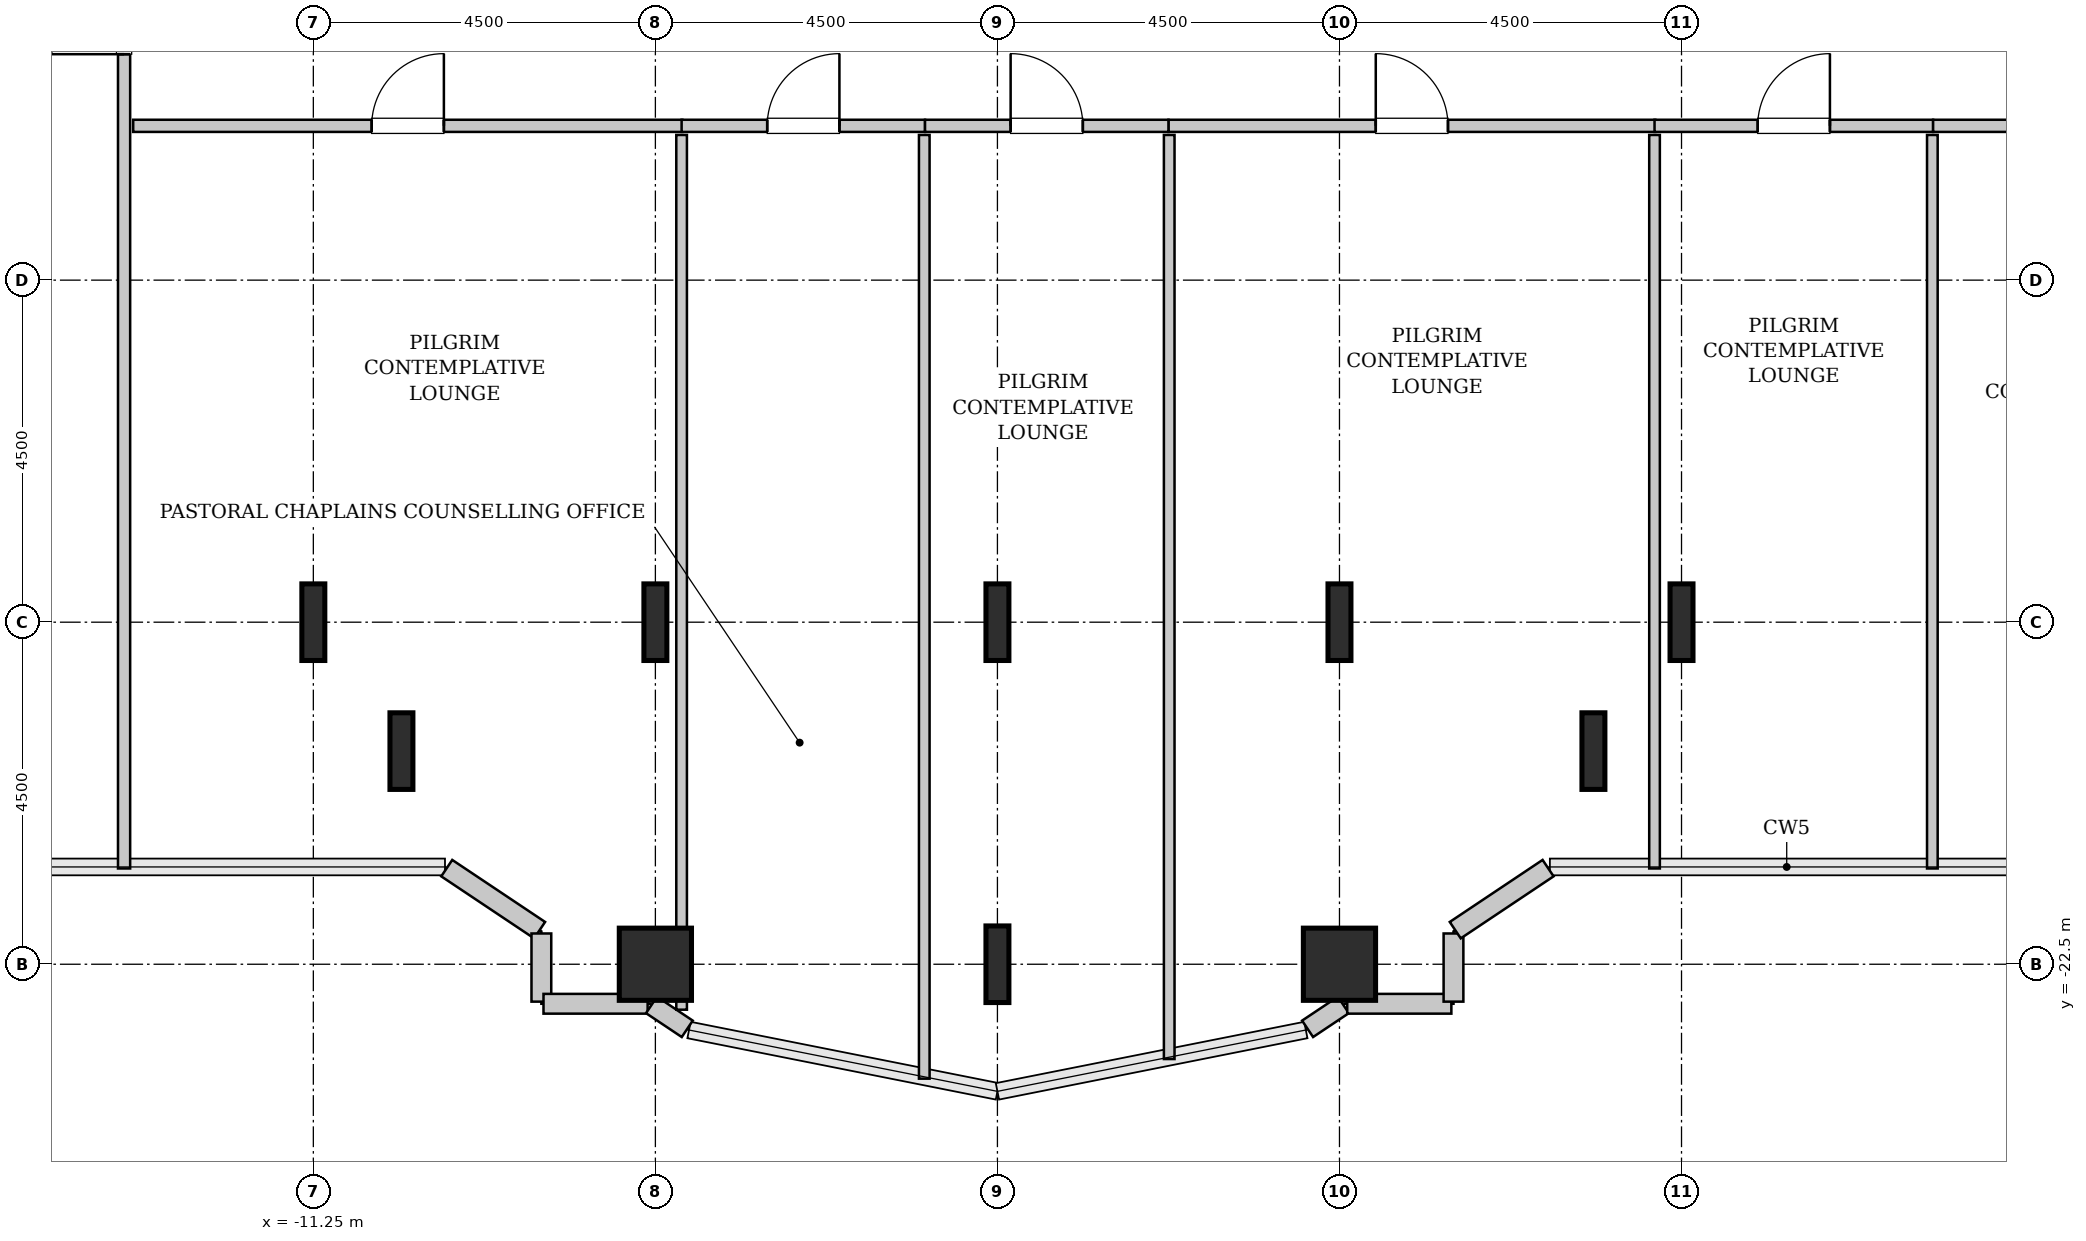
"""IFC4 building model, lengths in metres.
Left out: names, types, materials, properties, quantities, classifications, styles, units other than length and angle.
Written with IfcOpenShell. Run it as: python <this file> out.ifc"""

import sys

from ifc_helpers import new_model, si_unit, direction, frame, frame_2d, origin, origin_2d, place, context, subcontext, project, spatial, rectangle, hollow_rectangle, i_section, extrude, source, transform, mapped, element, fill, save


model = new_model("IFC4")
c1 = context("Model", 3, precision=1e-05, world=origin(), true_north=direction((0.0, 1.0)))
c2 = subcontext(c1, "Body", "Model", "MODEL_VIEW")
j1 = project(units=[si_unit("LENGTHUNIT", "METRE"), si_unit("PLANEANGLEUNIT", "RADIAN")], contexts=[c1])
p1 = place(None, origin())
s1 = spatial("IfcSite", under=j1, at=p1, CompositionType="ELEMENT")
p2 = place(p1, origin())
s2 = spatial("IfcBuilding", under=s1, at=p2, CompositionType="ELEMENT")
p3 = place(p2, frame((0.0, 0.0, 74.8)))
s3 = spatial("IfcBuildingStorey", under=s2, at=p3, CompositionType="ELEMENT", Elevation=74.8)
m1 = source(origin(), c2, "Body", "SweptSolid", [
    extrude(i_section(OverallWidth=0.302, OverallDepth=1.008, WebThickness=0.021, FlangeThickness=0.04, FilletRadius=0.03, at=origin_2d()), origin(), (0.0, 0.0, 1.0), 3.8),
])
for number, where, z_axis, x_axis in (
    (1, (-11.25, -18.0, 0.0), (0.0, 0.0, 1.0), (1.0, 0.0, 0.0)),
    (2, (-10.091, -19.696, 0.0), (0.0, 0.0, 1.0), (1.0, 0.0, 0.0)),
):
    element("IfcColumn", number, at=place(p3, frame(where, z_axis=z_axis, x_axis=x_axis)), inside=s3, PredefinedType="COLUMN", context=c2, shape_type="MappedRepresentation", body=[
        mapped(m1, transform((0.0, 0.0, 0.0), x_axis=(1.0, 0.0, 0.0), y_axis=(0.0, 1.0, 0.0), z_axis=(0.0, 0.0, 1.0), scale=1.0)),
    ])
m2 = source(origin(), c2, "Body", "SweptSolid", [
    extrude(hollow_rectangle(XDim=0.95, YDim=0.95, WallThickness=0.045, InnerFilletRadius=0.045, OuterFilletRadius=0.09, at=origin_2d()), origin(), (0.0, 0.0, 1.0), 3.8),
])
p4 = place(p3, frame((-6.75, -22.5, 0.0), z_axis=(0.0, 0.0, 1.0), x_axis=(1.0, 0.0, 0.0)))
e3 = element("IfcColumn", 3, at=p4, inside=s3, PredefinedType="COLUMN", context=c2, shape_type="MappedRepresentation", body=[
    mapped(m2, transform((0.0, 0.0, 0.0), x_axis=(1.0, 0.0, 0.0), y_axis=(0.0, 1.0, 0.0), z_axis=(0.0, 0.0, 1.0), scale=1.0)),
])
for number, where, z_axis, x_axis in (
    (4, (-6.75, -18.0, 0.0), (0.0, 0.0, 1.0), (1.0, 0.0, 0.0)),
    (5, (-2.25, -22.5, 0.0), (0.0, 0.0, 1.0), (1.0, 0.0, 0.0)),
    (6, (-2.25, -18.0, 0.0), (0.0, 0.0, 1.0), (1.0, 0.0, 0.0)),
):
    element("IfcColumn", number, at=place(p3, frame(where, z_axis=z_axis, x_axis=x_axis)), inside=s3, PredefinedType="COLUMN", context=c2, shape_type="MappedRepresentation", body=[
        mapped(m1, transform((0.0, 0.0, 0.0), x_axis=(1.0, 0.0, 0.0), y_axis=(0.0, 1.0, 0.0), z_axis=(0.0, 0.0, 1.0), scale=1.0)),
    ])
p5 = place(p3, frame((2.25, -22.5, 0.0), z_axis=(0.0, 0.0, 1.0), x_axis=(1.0, 0.0, 0.0)))
e7 = element("IfcColumn", 7, at=p5, inside=s3, PredefinedType="COLUMN", context=c2, shape_type="MappedRepresentation", body=[
    mapped(m2, transform((0.0, 0.0, 0.0), x_axis=(1.0, 0.0, 0.0), y_axis=(0.0, 1.0, 0.0), z_axis=(0.0, 0.0, 1.0), scale=1.0)),
])
for number, where, z_axis, x_axis in (
    (8, (2.25, -18.0, 0.0), (0.0, 0.0, 1.0), (1.0, 0.0, 0.0)),
    (9, (5.591, -19.696, 0.0), (0.0, 0.0, 1.0), (1.0, 0.0, 0.0)),
    (10, (6.75, -18.0, 0.0), (0.0, 0.0, 1.0), (1.0, 0.0, 0.0)),
):
    element("IfcColumn", number, at=place(p3, frame(where, z_axis=z_axis, x_axis=x_axis)), inside=s3, PredefinedType="COLUMN", context=c2, shape_type="MappedRepresentation", body=[
        mapped(m1, transform((0.0, 0.0, 0.0), x_axis=(1.0, 0.0, 0.0), y_axis=(0.0, 1.0, 0.0), z_axis=(0.0, 0.0, 1.0), scale=1.0)),
    ])
m3 = source(origin(), c2, "Body", "SweptSolid", [
    extrude(rectangle(XDim=1.469, YDim=0.26, at=frame_2d((0.734, 0.0))), origin(), (0.0, 0.0, 1.0), 3.55),
])
p6 = place(p3, frame((-9.495, -21.236, 0.0), z_axis=(0.0, 0.0, 1.0), x_axis=(0.831461760506, -0.555581983884, 0.0)))
e11 = element("IfcWall", 11, at=p6, inside=s3, PredefinedType="SOLIDWALL", context=c2, shape_type="MappedRepresentation", body=[
    mapped(m3, transform((0.0, 0.0, 0.0), x_axis=(1.0, 0.0, 0.0), y_axis=(0.0, 1.0, 0.0), z_axis=(0.0, 0.0, 1.0), scale=1.0)),
])
m4 = source(origin(), c2, "Body", "SweptSolid", [
    extrude(rectangle(XDim=0.897, YDim=0.26, at=frame_2d((0.448, 0.0))), origin(), (0.0, 0.0, 1.0), 3.55),
])
p7 = place(p3, frame((-8.25, -22.095, 0.0), z_axis=(0.0, 0.0, 1.0), x_axis=(0.0, -1.0, 0.0)))
e12 = element("IfcWall", 12, at=p7, inside=s3, PredefinedType="SOLIDWALL", context=c2, shape_type="MappedRepresentation", body=[
    mapped(m4, transform((0.0, 0.0, 0.0), x_axis=(1.0, 0.0, 0.0), y_axis=(0.0, 1.0, 0.0), z_axis=(0.0, 0.0, 1.0), scale=1.0)),
])
m5 = source(origin(), c2, "Body", "SweptSolid", [
    extrude(rectangle(XDim=1.37, YDim=0.26, at=frame_2d((0.685, 0.0))), origin(), (0.0, 0.0, 1.0), 3.55),
])
p8 = place(p3, frame((-8.222, -23.02, 0.0), z_axis=(0.0, 0.0, 1.0), x_axis=(1.0, 0.0, 0.0)))
e13 = element("IfcWall", 13, at=p8, inside=s3, PredefinedType="SOLIDWALL", context=c2, shape_type="MappedRepresentation", body=[
    mapped(m5, transform((0.0, 0.0, 0.0), x_axis=(1.0, 0.0, 0.0), y_axis=(0.0, 1.0, 0.0), z_axis=(0.0, 0.0, 1.0), scale=1.0)),
])
m6 = source(origin(), c2, "Body", "SweptSolid", [
    extrude(rectangle(XDim=0.565, YDim=0.26, at=frame_2d((0.283, 0.0))), origin(), (0.0, 0.0, 1.0), 3.55),
])
for number, where, z_axis, x_axis in (
    (14, (-6.801, -23.036, 0.0), (0.0, 0.0, 1.0), (0.832, -0.555, 0.0)),
    (15, (1.831, -23.35, 0.0), (0.0, 0.0, 1.0), (0.832, 0.555, 0.0)),
):
    element("IfcWall", number, at=place(p3, frame(where, z_axis=z_axis, x_axis=x_axis)), inside=s3, PredefinedType="SOLIDWALL", context=c2, shape_type="MappedRepresentation", body=[
        mapped(m6, transform((0.0, 0.0, 0.0), x_axis=(1.0, 0.0, 0.0), y_axis=(0.0, 1.0, 0.0), z_axis=(0.0, 0.0, 1.0), scale=1.0)),
    ])
p9 = place(p3, frame((2.352, -23.02, 0.0), z_axis=(0.0, 0.0, 1.0), x_axis=(1.0, 0.0, 0.0)))
e16 = element("IfcWall", 16, at=p9, inside=s3, PredefinedType="SOLIDWALL", context=c2, shape_type="MappedRepresentation", body=[
    mapped(m5, transform((0.0, 0.0, 0.0), x_axis=(1.0, 0.0, 0.0), y_axis=(0.0, 1.0, 0.0), z_axis=(0.0, 0.0, 1.0), scale=1.0)),
])
p10 = place(p3, frame((3.75, -22.992, 0.0), z_axis=(0.0, 0.0, 1.0), x_axis=(0.0, 1.0, 0.0)))
e17 = element("IfcWall", 17, at=p10, inside=s3, PredefinedType="SOLIDWALL", context=c2, shape_type="MappedRepresentation", body=[
    mapped(m4, transform((0.0, 0.0, 0.0), x_axis=(1.0, 0.0, 0.0), y_axis=(0.0, 1.0, 0.0), z_axis=(0.0, 0.0, 1.0), scale=1.0)),
])
p11 = place(p3, frame((3.773, -22.052, 0.0), z_axis=(0.0, 0.0, 1.0), x_axis=(0.831461760506, 0.555581983884, 0.0)))
e18 = element("IfcWall", 18, at=p11, inside=s3, PredefinedType="SOLIDWALL", context=c2, shape_type="MappedRepresentation", body=[
    mapped(m3, transform((0.0, 0.0, 0.0), x_axis=(1.0, 0.0, 0.0), y_axis=(0.0, 1.0, 0.0), z_axis=(0.0, 0.0, 1.0), scale=1.0)),
])
m7 = source(origin(), c2, "Body", "SweptSolid", [
    extrude(rectangle(XDim=12.645, YDim=0.16, at=frame_2d((6.323, 0.0))), origin(), (0.0, 0.0, 1.0), 3.535),
])
p12 = place(p3, frame((-13.74, -21.24, 0.0), z_axis=(0.0, 0.0, 1.0), x_axis=(0.0, 1.0, 0.0)))
e19 = element("IfcWall", 19, at=p12, inside=s3, PredefinedType="PARTITIONING", context=c2, shape_type="MappedRepresentation", body=[
    mapped(m7, transform((0.0, 0.0, 0.0), x_axis=(1.0, 0.0, 0.0), y_axis=(0.0, 1.0, 0.0), z_axis=(0.0, 0.0, 1.0), scale=1.0)),
])
p13 = place(p12, frame((10.712, 0.0, 0.0)))
e20 = element("IfcOpeningElement", 20, at=p13, cuts=e19, PredefinedType="OPENING", context=c2, shape_type="SweptSolid", body=[
    extrude(rectangle(XDim=0.95, YDim=2.1, at=frame_2d((0.475, 1.05))), frame((0.0, 0.09, 0.0), z_axis=(0.0, -1.0, 0.0), x_axis=(1.0, 0.0, 0.0)), (0.0, 0.0, 1.0), 0.18),
])
m8 = source(origin(), c2, "Body", "SweptSolid", [
    extrude(rectangle(XDim=7.225, YDim=0.16, at=frame_2d((3.613, 0.0))), origin(), (0.0, 0.0, 1.0), 3.535),
])
p14 = place(p3, frame((-13.62, -11.47, 0.0), z_axis=(0.0, 0.0, 1.0), x_axis=(1.0, 0.0, 0.0)))
e21 = element("IfcWall", 21, at=p14, inside=s3, PredefinedType="PARTITIONING", context=c2, shape_type="MappedRepresentation", body=[
    mapped(m8, transform((0.0, 0.0, 0.0), x_axis=(1.0, 0.0, 0.0), y_axis=(0.0, 1.0, 0.0), z_axis=(0.0, 0.0, 1.0), scale=1.0)),
])
p15 = place(p14, frame((3.137, 0.0, 0.0)))
e22 = element("IfcOpeningElement", 22, at=p15, cuts=e21, PredefinedType="OPENING", context=c2, shape_type="SweptSolid", body=[
    extrude(rectangle(XDim=0.95, YDim=2.1, at=frame_2d((0.475, 1.05))), frame((0.0, 0.09, 0.0), z_axis=(0.0, -1.0, 0.0), x_axis=(1.0, 0.0, 0.0)), (0.0, 0.0, 1.0), 0.18),
])
m9 = source(origin(), c2, "Body", "SweptSolid", [
    extrude(rectangle(XDim=11.508, YDim=0.14, at=frame_2d((5.754, 0.0))), origin(), (0.0, 0.0, 1.0), 2.825),
])
p16 = place(p3, frame((-6.405, -23.098, 0.0), z_axis=(0.0, 0.0, 1.0), x_axis=(0.0, 1.0, 0.0)))
e23 = element("IfcWall", 23, at=p16, inside=s3, PredefinedType="PARTITIONING", context=c2, shape_type="MappedRepresentation", body=[
    mapped(m9, transform((0.0, 0.0, 0.0), x_axis=(1.0, 0.0, 0.0), y_axis=(0.0, 1.0, 0.0), z_axis=(0.0, 0.0, 1.0), scale=1.0)),
])
m10 = source(origin(), c2, "Body", "SweptSolid", [
    extrude(rectangle(XDim=6.405, YDim=0.16, at=frame_2d((3.203, 0.0))), origin(), (0.0, 0.0, 1.0), 3.535),
])
p17 = place(p3, frame((0.0, -11.47, 0.0), z_axis=(0.0, 0.0, 1.0), x_axis=(1.0, 0.0, 0.0)))
e24 = element("IfcWall", 24, at=p17, inside=s3, PredefinedType="PARTITIONING", context=c2, shape_type="MappedRepresentation", body=[
    mapped(m10, transform((0.0, 0.0, 0.0), x_axis=(1.0, 0.0, 0.0), y_axis=(0.0, 1.0, 0.0), z_axis=(0.0, 0.0, 1.0), scale=1.0)),
])
p18 = place(p17, frame((2.728, 0.0, 0.0)))
e25 = element("IfcOpeningElement", 25, at=p18, cuts=e24, PredefinedType="OPENING", context=c2, shape_type="SweptSolid", body=[
    extrude(rectangle(XDim=0.95, YDim=2.1, at=frame_2d((0.475, 1.05))), frame((0.0, 0.09, 0.0), z_axis=(0.0, -1.0, 0.0), x_axis=(1.0, 0.0, 0.0)), (0.0, 0.0, 1.0), 0.18),
])
m11 = source(origin(), c2, "Body", "SweptSolid", [
    extrude(rectangle(XDim=12.157, YDim=0.14, at=frame_2d((6.079, 0.0))), origin(), (0.0, 0.0, 1.0), 3.535),
])
p19 = place(p3, frame((0.01, -23.747, 0.0), z_axis=(0.0, 0.0, 1.0), x_axis=(0.0, 1.0, 0.0)))
e26 = element("IfcWall", 26, at=p19, inside=s3, PredefinedType="PARTITIONING", context=c2, shape_type="MappedRepresentation", body=[
    mapped(m11, transform((0.0, 0.0, 0.0), x_axis=(1.0, 0.0, 0.0), y_axis=(0.0, 1.0, 0.0), z_axis=(0.0, 0.0, 1.0), scale=1.0)),
])
m12 = source(origin(), c2, "Body", "SweptSolid", [
    extrude(rectangle(XDim=9.65, YDim=0.14, at=frame_2d((4.825, 0.0))), origin(), (0.0, 0.0, 1.0), 3.535),
])
p20 = place(p3, frame((6.395, -21.24, 0.0), z_axis=(0.0, 0.0, 1.0), x_axis=(0.0, 1.0, 0.0)))
e27 = element("IfcWall", 27, at=p20, inside=s3, PredefinedType="PARTITIONING", context=c2, shape_type="MappedRepresentation", body=[
    mapped(m12, transform((0.0, 0.0, 0.0), x_axis=(1.0, 0.0, 0.0), y_axis=(0.0, 1.0, 0.0), z_axis=(0.0, 0.0, 1.0), scale=1.0)),
])
m13 = source(origin(), c2, "Body", "SweptSolid", [
    extrude(rectangle(XDim=3.203, YDim=0.16, at=frame_2d((1.601, 0.0))), origin(), (0.0, 0.0, 1.0), 3.535),
])
p21 = place(p3, frame((-6.405, -11.47, 0.0), z_axis=(0.0, 0.0, 1.0), x_axis=(1.0, 0.0, 0.0)))
e28 = element("IfcWall", 28, at=p21, inside=s3, PredefinedType="PARTITIONING", context=c2, shape_type="MappedRepresentation", body=[
    mapped(m13, transform((0.0, 0.0, 0.0), x_axis=(1.0, 0.0, 0.0), y_axis=(0.0, 1.0, 0.0), z_axis=(0.0, 0.0, 1.0), scale=1.0)),
])
p22 = place(p21, frame((1.126, 0.0, 0.0)))
e29 = element("IfcOpeningElement", 29, at=p22, cuts=e28, PredefinedType="OPENING", context=c2, shape_type="SweptSolid", body=[
    extrude(rectangle(XDim=0.95, YDim=2.1, at=frame_2d((0.475, 1.05))), frame((0.0, 0.09, 0.0), z_axis=(0.0, -1.0, 0.0), x_axis=(1.0, 0.0, 0.0)), (0.0, 0.0, 1.0), 0.18),
])
m14 = source(origin(), c2, "Body", "SweptSolid", [
    extrude(rectangle(XDim=12.415, YDim=0.14, at=frame_2d((6.208, 0.0))), origin(), (0.0, 0.0, 1.0), 3.535),
])
p23 = place(p3, frame((-3.212, -24.005, 0.0), z_axis=(0.0, 0.0, 1.0), x_axis=(0.0, 1.0, 0.0)))
e30 = element("IfcWall", 30, at=p23, inside=s3, PredefinedType="PARTITIONING", context=c2, shape_type="MappedRepresentation", body=[
    mapped(m14, transform((0.0, 0.0, 0.0), x_axis=(1.0, 0.0, 0.0), y_axis=(0.0, 1.0, 0.0), z_axis=(0.0, 0.0, 1.0), scale=1.0)),
])
m15 = source(origin(), c2, "Body", "SweptSolid", [
    extrude(rectangle(XDim=3.202, YDim=0.16, at=frame_2d((1.601, 0.0))), origin(), (0.0, 0.0, 1.0), 3.535),
])
p24 = place(p3, frame((-3.202, -11.47, 0.0), z_axis=(0.0, 0.0, 1.0), x_axis=(1.0, 0.0, 0.0)))
e31 = element("IfcWall", 31, at=p24, inside=s3, PredefinedType="PARTITIONING", context=c2, shape_type="MappedRepresentation", body=[
    mapped(m15, transform((0.0, 0.0, 0.0), x_axis=(1.0, 0.0, 0.0), y_axis=(0.0, 1.0, 0.0), z_axis=(0.0, 0.0, 1.0), scale=1.0)),
])
p25 = place(p24, frame((1.126, 0.0, 0.0)))
e32 = element("IfcOpeningElement", 32, at=p25, cuts=e31, PredefinedType="OPENING", context=c2, shape_type="SweptSolid", body=[
    extrude(rectangle(XDim=0.95, YDim=2.1, at=frame_2d((0.475, 1.05))), frame((0.0, 0.09, 0.0), z_axis=(0.0, -1.0, 0.0), x_axis=(1.0, 0.0, 0.0)), (0.0, 0.0, 1.0), 0.18),
])
m16 = source(origin(), c2, "Body", "SweptSolid", [
    extrude(rectangle(XDim=3.665, YDim=0.16, at=frame_2d((1.833, 0.0))), origin(), (0.0, 0.0, 1.0), 3.535),
])
p26 = place(p3, frame((6.395, -11.47, 0.0), z_axis=(0.0, 0.0, 1.0), x_axis=(1.0, 0.0, 0.0)))
e33 = element("IfcWall", 33, at=p26, inside=s3, PredefinedType="PARTITIONING", context=c2, shape_type="MappedRepresentation", body=[
    mapped(m16, transform((0.0, 0.0, 0.0), x_axis=(1.0, 0.0, 0.0), y_axis=(0.0, 1.0, 0.0), z_axis=(0.0, 0.0, 1.0), scale=1.0)),
])
p27 = place(p26, frame((1.357, 0.0, 0.0)))
e34 = element("IfcOpeningElement", 34, at=p27, cuts=e33, PredefinedType="OPENING", context=c2, shape_type="SweptSolid", body=[
    extrude(rectangle(XDim=0.95, YDim=2.1, at=frame_2d((0.475, 1.05))), frame((0.0, 0.09, 0.0), z_axis=(0.0, -1.0, 0.0), x_axis=(1.0, 0.0, 0.0)), (0.0, 0.0, 1.0), 0.18),
])
p28 = place(p3, frame((10.05, -21.24, 0.0), z_axis=(0.0, 0.0, 1.0), x_axis=(0.0, 1.0, 0.0)))
e35 = element("IfcWall", 35, at=p28, inside=s3, PredefinedType="PARTITIONING", context=c2, shape_type="MappedRepresentation", body=[
    mapped(m12, transform((0.0, 0.0, 0.0), x_axis=(1.0, 0.0, 0.0), y_axis=(0.0, 1.0, 0.0), z_axis=(0.0, 0.0, 1.0), scale=1.0)),
])
m17 = source(origin(), c2, "Body", "SweptSolid", [
    extrude(rectangle(XDim=3.56, YDim=0.16, at=frame_2d((1.78, 0.0))), origin(), (0.0, 0.0, 1.0), 3.535),
])
p29 = place(p3, frame((10.06, -11.47, 0.0), z_axis=(0.0, 0.0, 1.0), x_axis=(1.0, 0.0, 0.0)))
e36 = element("IfcWall", 36, at=p29, inside=s3, PredefinedType="PARTITIONING", context=c2, shape_type="MappedRepresentation", body=[
    mapped(m17, transform((0.0, 0.0, 0.0), x_axis=(1.0, 0.0, 0.0), y_axis=(0.0, 1.0, 0.0), z_axis=(0.0, 0.0, 1.0), scale=1.0)),
])
p30 = place(p29, frame((1.305, 0.0, 0.0)))
e37 = element("IfcOpeningElement", 37, at=p30, cuts=e36, PredefinedType="OPENING", context=c2, shape_type="SweptSolid", body=[
    extrude(rectangle(XDim=0.95, YDim=2.1, at=frame_2d((0.475, 1.05))), frame((0.0, 0.09, 0.0), z_axis=(0.0, -1.0, 0.0), x_axis=(1.0, 0.0, 0.0)), (0.0, 0.0, 1.0), 0.18),
])
m18 = source(origin(), c2, "Body", "SweptSolid", [
    extrude(rectangle(XDim=0.95, YDim=2.1, at=frame_2d((0.475, 1.05))), frame((0.0, 0.025, 0.0), z_axis=(0.0, -1.0, 0.0), x_axis=(1.0, 0.0, 0.0)), (0.0, 0.0, 1.0), 0.05),
])
p31 = place(p13, origin())
e38 = element("IfcDoor", 38, at=p31, inside=s3, OperationType="SINGLE_SWING_LEFT", PredefinedType="DOOR", context=c2, shape_type="MappedRepresentation", body=[
    mapped(m18, transform((0.0, 0.0, 0.0), x_axis=(1.0, 0.0, 0.0), y_axis=(0.0, 1.0, 0.0), z_axis=(0.0, 0.0, 1.0), scale=1.0)),
])
fill(e20, e38)
p32 = place(p15, origin())
e39 = element("IfcDoor", 39, at=p32, inside=s3, OperationType="SINGLE_SWING_RIGHT", PredefinedType="DOOR", context=c2, shape_type="MappedRepresentation", body=[
    mapped(m18, transform((0.0, 0.0, 0.0), x_axis=(1.0, 0.0, 0.0), y_axis=(0.0, 1.0, 0.0), z_axis=(0.0, 0.0, 1.0), scale=1.0)),
])
fill(e22, e39)
p33 = place(p18, origin())
e40 = element("IfcDoor", 40, at=p33, inside=s3, OperationType="SINGLE_SWING_LEFT", PredefinedType="DOOR", context=c2, shape_type="MappedRepresentation", body=[
    mapped(m18, transform((0.0, 0.0, 0.0), x_axis=(1.0, 0.0, 0.0), y_axis=(0.0, 1.0, 0.0), z_axis=(0.0, 0.0, 1.0), scale=1.0)),
])
fill(e25, e40)
p34 = place(p22, origin())
e41 = element("IfcDoor", 41, at=p34, inside=s3, OperationType="SINGLE_SWING_RIGHT", PredefinedType="DOOR", context=c2, shape_type="MappedRepresentation", body=[
    mapped(m18, transform((0.0, 0.0, 0.0), x_axis=(1.0, 0.0, 0.0), y_axis=(0.0, 1.0, 0.0), z_axis=(0.0, 0.0, 1.0), scale=1.0)),
])
fill(e29, e41)
p35 = place(p25, origin())
e42 = element("IfcDoor", 42, at=p35, inside=s3, OperationType="SINGLE_SWING_LEFT", PredefinedType="DOOR", context=c2, shape_type="MappedRepresentation", body=[
    mapped(m18, transform((0.0, 0.0, 0.0), x_axis=(1.0, 0.0, 0.0), y_axis=(0.0, 1.0, 0.0), z_axis=(0.0, 0.0, 1.0), scale=1.0)),
])
fill(e32, e42)
p36 = place(p27, origin())
e43 = element("IfcDoor", 43, at=p36, inside=s3, OperationType="SINGLE_SWING_RIGHT", PredefinedType="DOOR", context=c2, shape_type="MappedRepresentation", body=[
    mapped(m18, transform((0.0, 0.0, 0.0), x_axis=(1.0, 0.0, 0.0), y_axis=(0.0, 1.0, 0.0), z_axis=(0.0, 0.0, 1.0), scale=1.0)),
])
fill(e34, e43)
save(model, sys.argv[1])
